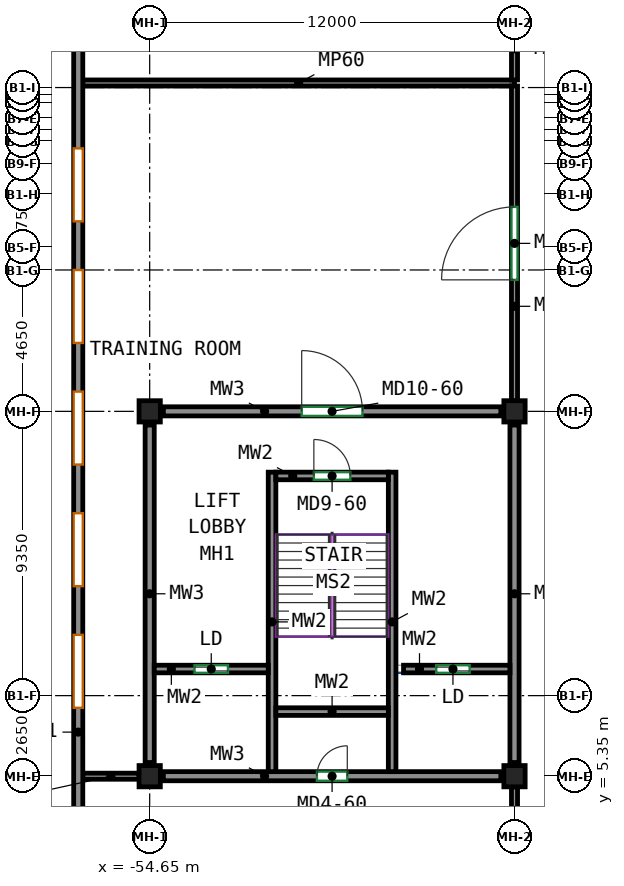
"""IFC4 building model, lengths in metres.
Left out: names, types, materials, properties, quantities, classifications, styles, units other than length and angle.
Written with IfcOpenShell. Run it as: python <this file> out.ifc"""

import sys

from ifc_helpers import new_model, si_unit, direction, frame, frame_2d, origin, origin_2d, place, context, subcontext, project, spatial, rectangle, extrude, source, transform, mapped, element, fill, save


model = new_model("IFC4")
c1 = context("Model", 3, precision=1e-05, world=origin(), true_north=direction((0.0, 1.0)))
c2 = subcontext(c1, "Body", "Model", "MODEL_VIEW")
j1 = project(units=[si_unit("LENGTHUNIT", "METRE"), si_unit("PLANEANGLEUNIT", "RADIAN")], contexts=[c1])
p1 = place(None, origin())
s1 = spatial("IfcSite", under=j1, at=p1, CompositionType="ELEMENT")
p2 = place(p1, origin())
s2 = spatial("IfcBuilding", under=s1, at=p2, CompositionType="ELEMENT")
p3 = place(p2, frame((0.0, 0.0, 18.0)))
s3 = spatial("IfcBuildingStorey", under=s2, at=p3, CompositionType="ELEMENT", Elevation=18.0)
m1 = source(origin(), c2, "Body", "SweptSolid", [
    extrude(rectangle(XDim=0.7, YDim=0.7, at=origin_2d()), origin(), (0.0, 0.0, 1.0), 4.1),
])
for number, where, z_axis, x_axis in (
    (1, (-54.65, 5.35, 0.0), (0.0, 0.0, 1.0), (1.0, 0.0, 0.0)),
    (2, (-54.65, 17.35, 0.0), (0.0, 0.0, 1.0), (1.0, 0.0, 0.0)),
    (3, (-42.65, 5.35, 0.0), (0.0, 0.0, 1.0), (1.0, 0.0, 0.0)),
    (4, (-42.65, 17.35, 0.0), (0.0, 0.0, 1.0), (1.0, 0.0, 0.0)),
):
    element("IfcColumn", number, at=place(p3, frame(where, z_axis=z_axis, x_axis=x_axis)), inside=s3, PredefinedType="COLUMN", context=c2, shape_type="MappedRepresentation", body=[
        mapped(m1, transform((0.0, 0.0, 0.0))),
    ])
m2 = source(origin(), c2, "Body", "SweptSolid", [
    extrude(rectangle(XDim=11.1, YDim=0.3, at=frame_2d((5.55, 0.0))), origin(), (0.0, 0.0, 1.0), 3.3),
])
p4 = place(p3, frame((-54.2, 5.35, 0.0), z_axis=(0.0, 0.0, 1.0), x_axis=(1.0, 0.0, 0.0)))
e5 = element("IfcWall", 5, at=p4, inside=s3, PredefinedType="SHEAR", context=c2, shape_type="MappedRepresentation", body=[
    mapped(m2, transform((0.0, 0.0, 0.0))),
])
p5 = place(p4, frame((5.05, 0.0, 0.0)))
e6 = element("IfcOpeningElement", 6, at=p5, cuts=e5, PredefinedType="OPENING", context=c2, shape_type="SweptSolid", body=[
    extrude(rectangle(XDim=1.0, YDim=2.1, at=frame_2d((0.5, 1.05))), frame((0.0, 0.16, 0.0), z_axis=(0.0, -1.0, 0.0), x_axis=(1.0, 0.0, 0.0)), (0.0, 0.0, 1.0), 0.32),
])
p6 = place(p3, frame((-54.2, 17.35, 0.0), z_axis=(0.0, 0.0, 1.0), x_axis=(1.0, 0.0, 0.0)))
e7 = element("IfcWall", 7, at=p6, inside=s3, PredefinedType="SHEAR", context=c2, shape_type="MappedRepresentation", body=[
    mapped(m2, transform((0.0, 0.0, 0.0))),
])
p7 = place(p6, frame((4.55, 0.0, 0.0)))
e8 = element("IfcOpeningElement", 8, at=p7, cuts=e7, PredefinedType="OPENING", context=c2, shape_type="SweptSolid", body=[
    extrude(rectangle(XDim=2.0, YDim=2.4, at=frame_2d((1.0, 1.2))), frame((0.0, 0.16, 0.0), z_axis=(0.0, -1.0, 0.0), x_axis=(1.0, 0.0, 0.0)), (0.0, 0.0, 1.0), 0.32),
])
for number, where, z_axis, x_axis in (
    (9, (-54.65, 5.8, 0.0), (0.0, 0.0, 1.0), (0.0, 1.0, 0.0)),
    (10, (-42.65, 5.8, 0.0), (0.0, 0.0, 1.0), (0.0, 1.0, 0.0)),
):
    element("IfcWall", number, at=place(p3, frame(where, z_axis=z_axis, x_axis=x_axis)), inside=s3, PredefinedType="SHEAR", context=c2, shape_type="MappedRepresentation", body=[
        mapped(m2, transform((0.0, 0.0, 0.0))),
    ])
m3 = source(origin(), c2, "Body", "SweptSolid", [
    extrude(rectangle(XDim=9.85, YDim=0.25, at=frame_2d((4.925, 0.0))), origin(), (0.0, 0.0, 1.0), 4.1),
])
for number, where, z_axis, x_axis in (
    (11, (-50.625, 5.5, 0.0), (0.0, 0.0, 1.0), (0.0, 1.0, 0.0)),
    (12, (-46.675, 5.5, 0.0), (0.0, 0.0, 1.0), (0.0, 1.0, 0.0)),
):
    element("IfcWall", number, at=place(p3, frame(where, z_axis=z_axis, x_axis=x_axis)), inside=s3, PredefinedType="SHEAR", context=c2, shape_type="MappedRepresentation", body=[
        mapped(m3, transform((0.0, 0.0, 0.0))),
    ])
m4 = source(origin(), c2, "Body", "SweptSolid", [
    extrude(rectangle(XDim=3.7, YDim=0.25, at=frame_2d((1.85, 0.0))), origin(), (0.0, 0.0, 1.0), 4.1),
])
p8 = place(p3, frame((-50.5, 7.475, 0.0), z_axis=(0.0, 0.0, 1.0), x_axis=(1.0, 0.0, 0.0)))
e13 = element("IfcWall", 13, at=p8, inside=s3, PredefinedType="SHEAR", context=c2, shape_type="MappedRepresentation", body=[
    mapped(m4, transform((0.0, 0.0, 0.0))),
])
p9 = place(p3, frame((-50.5, 15.225, 0.0), z_axis=(0.0, 0.0, 1.0), x_axis=(1.0, 0.0, 0.0)))
e14 = element("IfcWall", 14, at=p9, inside=s3, PredefinedType="SHEAR", context=c2, shape_type="MappedRepresentation", body=[
    mapped(m4, transform((0.0, 0.0, 0.0))),
])
p10 = place(p9, frame((1.25, 0.0, 0.0)))
e15 = element("IfcOpeningElement", 15, at=p10, cuts=e14, PredefinedType="OPENING", context=c2, shape_type="SweptSolid", body=[
    extrude(rectangle(XDim=1.2, YDim=2.1, at=frame_2d((0.6, 1.05))), frame((0.0, 0.135, 0.0), z_axis=(0.0, -1.0, 0.0), x_axis=(1.0, 0.0, 0.0)), (0.0, 0.0, 1.0), 0.27),
])
m5 = source(origin(), c2, "Body", "SweptSolid", [
    extrude(rectangle(XDim=3.75, YDim=0.25, at=frame_2d((1.875, 0.0))), origin(), (0.0, 0.0, 1.0), 4.1),
])
p11 = place(p3, frame((-54.5, 8.875, 0.0), z_axis=(0.0, 0.0, 1.0), x_axis=(1.0, 0.0, 0.0)))
e16 = element("IfcWall", 16, at=p11, inside=s3, PredefinedType="SHEAR", context=c2, shape_type="MappedRepresentation", body=[
    mapped(m5, transform((0.0, 0.0, 0.0))),
])
p12 = place(p11, frame((1.325, 0.0, 0.0)))
e17 = element("IfcOpeningElement", 17, at=p12, cuts=e16, PredefinedType="OPENING", context=c2, shape_type="SweptSolid", body=[
    extrude(rectangle(XDim=1.1, YDim=2.1, at=frame_2d((0.55, 1.05))), frame((0.0, 0.135, 0.0), z_axis=(0.0, -1.0, 0.0), x_axis=(1.0, 0.0, 0.0)), (0.0, 0.0, 1.0), 0.27),
])
m6 = source(origin(), c2, "Body", "SweptSolid", [
    extrude(rectangle(XDim=3.5, YDim=0.25, at=frame_2d((1.75, 0.0))), origin(), (0.0, 0.0, 1.0), 4.1),
])
p13 = place(p3, frame((-46.3, 8.875, 0.0), z_axis=(0.0, 0.0, 1.0), x_axis=(1.0, 0.0, 0.0)))
e18 = element("IfcWall", 18, at=p13, inside=s3, PredefinedType="SHEAR", context=c2, shape_type="MappedRepresentation", body=[
    mapped(m6, transform((0.0, 0.0, 0.0))),
])
p14 = place(p13, frame((1.075, 0.0, 0.0)))
e19 = element("IfcOpeningElement", 19, at=p14, cuts=e18, PredefinedType="OPENING", context=c2, shape_type="SweptSolid", body=[
    extrude(rectangle(XDim=1.1, YDim=2.1, at=frame_2d((0.55, 1.05))), frame((0.0, 0.135, 0.0), z_axis=(0.0, -1.0, 0.0), x_axis=(1.0, 0.0, 0.0)), (0.0, 0.0, 1.0), 0.27),
])
m7 = source(origin(), c2, "Body", "SweptSolid", [
    extrude(rectangle(XDim=100.7, YDim=0.3, at=frame_2d((50.35, 0.0))), origin(), (0.0, 0.0, 1.0), 4.1),
])
p15 = place(p3, frame((-57.0, -43.55, 0.0), z_axis=(0.0, 0.0, 1.0), x_axis=(0.0, 1.0, 0.0)))
e20 = element("IfcWall", 20, at=p15, inside=s3, PredefinedType="SOLIDWALL", context=c2, shape_type="MappedRepresentation", body=[
    mapped(m7, transform((0.0, 0.0, 0.0))),
])
p16 = place(p15, frame((3.15, 0.0, 0.9)))
e21 = element("IfcOpeningElement", 21, at=p16, cuts=e20, PredefinedType="OPENING", context=c2, shape_type="SweptSolid", body=[
    extrude(rectangle(XDim=2.4, YDim=1.8, at=frame_2d((1.2, 0.9))), frame((0.0, 0.16, 0.0), z_axis=(0.0, -1.0, 0.0), x_axis=(1.0, 0.0, 0.0)), (0.0, 0.0, 1.0), 0.32),
])
p17 = place(p15, frame((7.15, 0.0, 0.9)))
e22 = element("IfcOpeningElement", 22, at=p17, cuts=e20, PredefinedType="OPENING", context=c2, shape_type="SweptSolid", body=[
    extrude(rectangle(XDim=2.4, YDim=1.8, at=frame_2d((1.2, 0.9))), frame((0.0, 0.16, 0.0), z_axis=(0.0, -1.0, 0.0), x_axis=(1.0, 0.0, 0.0)), (0.0, 0.0, 1.0), 0.32),
])
p18 = place(p15, frame((11.15, 0.0, 0.9)))
e23 = element("IfcOpeningElement", 23, at=p18, cuts=e20, PredefinedType="OPENING", context=c2, shape_type="SweptSolid", body=[
    extrude(rectangle(XDim=2.4, YDim=1.8, at=frame_2d((1.2, 0.9))), frame((0.0, 0.16, 0.0), z_axis=(0.0, -1.0, 0.0), x_axis=(1.0, 0.0, 0.0)), (0.0, 0.0, 1.0), 0.32),
])
p19 = place(p15, frame((19.15, 0.0, 0.9)))
e24 = element("IfcOpeningElement", 24, at=p19, cuts=e20, PredefinedType="OPENING", context=c2, shape_type="SweptSolid", body=[
    extrude(rectangle(XDim=2.4, YDim=1.8, at=frame_2d((1.2, 0.9))), frame((0.0, 0.16, 0.0), z_axis=(0.0, -1.0, 0.0), x_axis=(1.0, 0.0, 0.0)), (0.0, 0.0, 1.0), 0.32),
])
p20 = place(p15, frame((23.15, 0.0, 0.9)))
e25 = element("IfcOpeningElement", 25, at=p20, cuts=e20, PredefinedType="OPENING", context=c2, shape_type="SweptSolid", body=[
    extrude(rectangle(XDim=2.4, YDim=1.8, at=frame_2d((1.2, 0.9))), frame((0.0, 0.16, 0.0), z_axis=(0.0, -1.0, 0.0), x_axis=(1.0, 0.0, 0.0)), (0.0, 0.0, 1.0), 0.32),
])
p21 = place(p15, frame((27.15, 0.0, 0.9)))
e26 = element("IfcOpeningElement", 26, at=p21, cuts=e20, PredefinedType="OPENING", context=c2, shape_type="SweptSolid", body=[
    extrude(rectangle(XDim=2.4, YDim=1.8, at=frame_2d((1.2, 0.9))), frame((0.0, 0.16, 0.0), z_axis=(0.0, -1.0, 0.0), x_axis=(1.0, 0.0, 0.0)), (0.0, 0.0, 1.0), 0.32),
])
p22 = place(p15, frame((31.15, 0.0, 0.9)))
e27 = element("IfcOpeningElement", 27, at=p22, cuts=e20, PredefinedType="OPENING", context=c2, shape_type="SweptSolid", body=[
    extrude(rectangle(XDim=2.4, YDim=1.8, at=frame_2d((1.2, 0.9))), frame((0.0, 0.16, 0.0), z_axis=(0.0, -1.0, 0.0), x_axis=(1.0, 0.0, 0.0)), (0.0, 0.0, 1.0), 0.32),
])
p23 = place(p15, frame((39.15, 0.0, 0.9)))
e28 = element("IfcOpeningElement", 28, at=p23, cuts=e20, PredefinedType="OPENING", context=c2, shape_type="SweptSolid", body=[
    extrude(rectangle(XDim=2.4, YDim=1.8, at=frame_2d((1.2, 0.9))), frame((0.0, 0.16, 0.0), z_axis=(0.0, -1.0, 0.0), x_axis=(1.0, 0.0, 0.0)), (0.0, 0.0, 1.0), 0.32),
])
p24 = place(p15, frame((43.15, 0.0, 0.9)))
e29 = element("IfcOpeningElement", 29, at=p24, cuts=e20, PredefinedType="OPENING", context=c2, shape_type="SweptSolid", body=[
    extrude(rectangle(XDim=2.4, YDim=1.8, at=frame_2d((1.2, 0.9))), frame((0.0, 0.16, 0.0), z_axis=(0.0, -1.0, 0.0), x_axis=(1.0, 0.0, 0.0)), (0.0, 0.0, 1.0), 0.32),
])
p25 = place(p15, frame((51.15, 0.0, 0.9)))
e30 = element("IfcOpeningElement", 30, at=p25, cuts=e20, PredefinedType="OPENING", context=c2, shape_type="SweptSolid", body=[
    extrude(rectangle(XDim=2.4, YDim=1.8, at=frame_2d((1.2, 0.9))), frame((0.0, 0.16, 0.0), z_axis=(0.0, -1.0, 0.0), x_axis=(1.0, 0.0, 0.0)), (0.0, 0.0, 1.0), 0.32),
])
p26 = place(p15, frame((55.15, 0.0, 0.9)))
e31 = element("IfcOpeningElement", 31, at=p26, cuts=e20, PredefinedType="OPENING", context=c2, shape_type="SweptSolid", body=[
    extrude(rectangle(XDim=2.4, YDim=1.8, at=frame_2d((1.2, 0.9))), frame((0.0, 0.16, 0.0), z_axis=(0.0, -1.0, 0.0), x_axis=(1.0, 0.0, 0.0)), (0.0, 0.0, 1.0), 0.32),
])
p27 = place(p15, frame((59.15, 0.0, 0.9)))
e32 = element("IfcOpeningElement", 32, at=p27, cuts=e20, PredefinedType="OPENING", context=c2, shape_type="SweptSolid", body=[
    extrude(rectangle(XDim=2.4, YDim=1.8, at=frame_2d((1.2, 0.9))), frame((0.0, 0.16, 0.0), z_axis=(0.0, -1.0, 0.0), x_axis=(1.0, 0.0, 0.0)), (0.0, 0.0, 1.0), 0.32),
])
p28 = place(p15, frame((63.15, 0.0, 0.9)))
e33 = element("IfcOpeningElement", 33, at=p28, cuts=e20, PredefinedType="OPENING", context=c2, shape_type="SweptSolid", body=[
    extrude(rectangle(XDim=2.4, YDim=1.8, at=frame_2d((1.2, 0.9))), frame((0.0, 0.16, 0.0), z_axis=(0.0, -1.0, 0.0), x_axis=(1.0, 0.0, 0.0)), (0.0, 0.0, 1.0), 0.32),
])
p29 = place(p15, frame((67.15, 0.0, 0.9)))
e34 = element("IfcOpeningElement", 34, at=p29, cuts=e20, PredefinedType="OPENING", context=c2, shape_type="SweptSolid", body=[
    extrude(rectangle(XDim=2.4, YDim=1.8, at=frame_2d((1.2, 0.9))), frame((0.0, 0.16, 0.0), z_axis=(0.0, -1.0, 0.0), x_axis=(1.0, 0.0, 0.0)), (0.0, 0.0, 1.0), 0.32),
])
p30 = place(p15, frame((75.15, 0.0, 0.9)))
e35 = element("IfcOpeningElement", 35, at=p30, cuts=e20, PredefinedType="OPENING", context=c2, shape_type="SweptSolid", body=[
    extrude(rectangle(XDim=2.4, YDim=1.8, at=frame_2d((1.2, 0.9))), frame((0.0, 0.16, 0.0), z_axis=(0.0, -1.0, 0.0), x_axis=(1.0, 0.0, 0.0)), (0.0, 0.0, 1.0), 0.32),
])
p31 = place(p15, frame((79.15, 0.0, 0.9)))
e36 = element("IfcOpeningElement", 36, at=p31, cuts=e20, PredefinedType="OPENING", context=c2, shape_type="SweptSolid", body=[
    extrude(rectangle(XDim=2.4, YDim=1.8, at=frame_2d((1.2, 0.9))), frame((0.0, 0.16, 0.0), z_axis=(0.0, -1.0, 0.0), x_axis=(1.0, 0.0, 0.0)), (0.0, 0.0, 1.0), 0.32),
])
p32 = place(p15, frame((83.15, 0.0, 0.9)))
e37 = element("IfcOpeningElement", 37, at=p32, cuts=e20, PredefinedType="OPENING", context=c2, shape_type="SweptSolid", body=[
    extrude(rectangle(XDim=2.4, YDim=1.8, at=frame_2d((1.2, 0.9))), frame((0.0, 0.16, 0.0), z_axis=(0.0, -1.0, 0.0), x_axis=(1.0, 0.0, 0.0)), (0.0, 0.0, 1.0), 0.32),
])
p33 = place(p15, frame((87.15, 0.0, 0.9)))
e38 = element("IfcOpeningElement", 38, at=p33, cuts=e20, PredefinedType="OPENING", context=c2, shape_type="SweptSolid", body=[
    extrude(rectangle(XDim=2.4, YDim=1.8, at=frame_2d((1.2, 0.9))), frame((0.0, 0.16, 0.0), z_axis=(0.0, -1.0, 0.0), x_axis=(1.0, 0.0, 0.0)), (0.0, 0.0, 1.0), 0.32),
])
p34 = place(p15, frame((91.15, 0.0, 0.9)))
e39 = element("IfcOpeningElement", 39, at=p34, cuts=e20, PredefinedType="OPENING", context=c2, shape_type="SweptSolid", body=[
    extrude(rectangle(XDim=2.4, YDim=1.8, at=frame_2d((1.2, 0.9))), frame((0.0, 0.16, 0.0), z_axis=(0.0, -1.0, 0.0), x_axis=(1.0, 0.0, 0.0)), (0.0, 0.0, 1.0), 0.32),
])
p35 = place(p15, frame((95.15, 0.0, 0.9)))
e40 = element("IfcOpeningElement", 40, at=p35, cuts=e20, PredefinedType="OPENING", context=c2, shape_type="SweptSolid", body=[
    extrude(rectangle(XDim=2.4, YDim=1.8, at=frame_2d((1.2, 0.9))), frame((0.0, 0.16, 0.0), z_axis=(0.0, -1.0, 0.0), x_axis=(1.0, 0.0, 0.0)), (0.0, 0.0, 1.0), 0.32),
])
m8 = source(origin(), c2, "Body", "SweptSolid", [
    extrude(rectangle(XDim=1.85, YDim=0.2, at=frame_2d((0.925, 0.0))), origin(), (0.0, 0.0, 1.0), 4.1),
])
p36 = place(p3, frame((-56.85, 5.35, 0.0), z_axis=(0.0, 0.0, 1.0), x_axis=(1.0, 0.0, 0.0)))
e41 = element("IfcWall", 41, at=p36, inside=s3, PredefinedType="PARTITIONING", context=c2, shape_type="MappedRepresentation", body=[
    mapped(m8, transform((0.0, 0.0, 0.0))),
])
m9 = source(origin(), c2, "Body", "SweptSolid", [
    extrude(rectangle(XDim=14.2, YDim=0.2, at=frame_2d((7.1, 0.0))), origin(), (0.0, 0.0, 1.0), 3.3),
])
p37 = place(p3, frame((-56.85, 28.15, 0.0), z_axis=(0.0, 0.0, 1.0), x_axis=(1.0, 0.0, 0.0)))
e42 = element("IfcWall", 42, at=p37, inside=s3, PredefinedType="PARTITIONING", context=c2, shape_type="MappedRepresentation", body=[
    mapped(m9, transform((0.0, 0.0, 0.0))),
])
m10 = source(origin(), c2, "Body", "SweptSolid", [
    extrude(rectangle(XDim=11.3, YDim=0.2, at=frame_2d((5.65, 0.0))), origin(), (0.0, 0.0, 1.0), 3.3),
])
p38 = place(p3, frame((-42.65, -6.3, 0.0), z_axis=(0.0, 0.0, 1.0), x_axis=(0.0, 1.0, 0.0)))
e43 = element("IfcWall", 43, at=p38, inside=s3, PredefinedType="PARTITIONING", context=c2, shape_type="MappedRepresentation", body=[
    mapped(m10, transform((0.0, 0.0, 0.0))),
])
p39 = place(p38, frame((5.15, 0.0, 0.0)))
e44 = element("IfcOpeningElement", 44, at=p39, cuts=e43, PredefinedType="OPENING", context=c2, shape_type="SweptSolid", body=[
    extrude(rectangle(XDim=1.0, YDim=2.1, at=frame_2d((0.5, 1.05))), frame((0.0, 0.11, 0.0), z_axis=(0.0, -1.0, 0.0), x_axis=(1.0, 0.0, 0.0)), (0.0, 0.0, 1.0), 0.22),
])
m11 = source(origin(), c2, "Body", "SweptSolid", [
    extrude(rectangle(XDim=10.35, YDim=0.2, at=frame_2d((5.175, 0.0))), origin(), (0.0, 0.0, 1.0), 3.3),
])
p40 = place(p3, frame((-42.65, 17.7, 0.0), z_axis=(0.0, 0.0, 1.0), x_axis=(0.0, 1.0, 0.0)))
e45 = element("IfcWall", 45, at=p40, inside=s3, PredefinedType="PARTITIONING", context=c2, shape_type="MappedRepresentation", body=[
    mapped(m11, transform((0.0, 0.0, 0.0))),
])
p41 = place(p40, frame((3.975, 0.0, 0.0)))
e46 = element("IfcOpeningElement", 46, at=p41, cuts=e45, PredefinedType="OPENING", context=c2, shape_type="SweptSolid", body=[
    extrude(rectangle(XDim=2.4, YDim=2.4, at=frame_2d((1.2, 1.2))), frame((0.0, 0.11, 0.0), z_axis=(0.0, -1.0, 0.0), x_axis=(1.0, 0.0, 0.0)), (0.0, 0.0, 1.0), 0.22),
])
m12 = source(origin(), c2, "Body", "SweptSolid", [
    extrude(rectangle(XDim=2.05, YDim=0.2, at=frame_2d((1.025, 0.0))), origin(), (0.0, 0.0, 1.0), 3.3),
])
p42 = place(p3, frame((-42.65, 28.25, 0.0), z_axis=(0.0, 0.0, 1.0), x_axis=(0.0, 1.0, 0.0)))
e47 = element("IfcWall", 47, at=p42, inside=s3, PredefinedType="PARTITIONING", context=c2, shape_type="MappedRepresentation", body=[
    mapped(m12, transform((0.0, 0.0, 0.0))),
])
p43 = place(p25, origin())
e48 = element("IfcWindow", 48, at=p43, inside=s3, PartitioningType="SINGLE_PANEL", PredefinedType="WINDOW", context=c2, shape_type="SweptSolid", body=[
    extrude(rectangle(XDim=2.4, YDim=1.8, at=frame_2d((1.2, 0.9))), frame((0.0, 0.03, 0.0), z_axis=(0.0, -1.0, 0.0), x_axis=(1.0, 0.0, 0.0)), (0.0, 0.0, 1.0), 0.06),
])
fill(e30, e48)
p44 = place(p26, origin())
e49 = element("IfcWindow", 49, at=p44, inside=s3, PartitioningType="SINGLE_PANEL", PredefinedType="WINDOW", context=c2, shape_type="SweptSolid", body=[
    extrude(rectangle(XDim=2.4, YDim=1.8, at=frame_2d((1.2, 0.9))), frame((0.0, 0.03, 0.0), z_axis=(0.0, -1.0, 0.0), x_axis=(1.0, 0.0, 0.0)), (0.0, 0.0, 1.0), 0.06),
])
fill(e31, e49)
p45 = place(p27, origin())
e50 = element("IfcWindow", 50, at=p45, inside=s3, PartitioningType="SINGLE_PANEL", PredefinedType="WINDOW", context=c2, shape_type="SweptSolid", body=[
    extrude(rectangle(XDim=2.4, YDim=1.8, at=frame_2d((1.2, 0.9))), frame((0.0, 0.03, 0.0), z_axis=(0.0, -1.0, 0.0), x_axis=(1.0, 0.0, 0.0)), (0.0, 0.0, 1.0), 0.06),
])
fill(e32, e50)
p46 = place(p28, origin())
e51 = element("IfcWindow", 51, at=p46, inside=s3, PartitioningType="SINGLE_PANEL", PredefinedType="WINDOW", context=c2, shape_type="SweptSolid", body=[
    extrude(rectangle(XDim=2.4, YDim=1.8, at=frame_2d((1.2, 0.9))), frame((0.0, 0.03, 0.0), z_axis=(0.0, -1.0, 0.0), x_axis=(1.0, 0.0, 0.0)), (0.0, 0.0, 1.0), 0.06),
])
fill(e33, e51)
p47 = place(p29, origin())
e52 = element("IfcWindow", 52, at=p47, inside=s3, PartitioningType="SINGLE_PANEL", PredefinedType="WINDOW", context=c2, shape_type="SweptSolid", body=[
    extrude(rectangle(XDim=2.4, YDim=1.8, at=frame_2d((1.2, 0.9))), frame((0.0, 0.03, 0.0), z_axis=(0.0, -1.0, 0.0), x_axis=(1.0, 0.0, 0.0)), (0.0, 0.0, 1.0), 0.06),
])
fill(e34, e52)
p48 = place(p10, origin())
e53 = element("IfcDoor", 53, at=p48, inside=s3, OperationType="DOUBLE_DOOR_SINGLE_SWING", PredefinedType="DOOR", context=c2, shape_type="SweptSolid", body=[
    extrude(rectangle(XDim=1.2, YDim=2.1, at=frame_2d((0.6, 1.05))), frame((0.0, 0.025, 0.0), z_axis=(0.0, -1.0, 0.0), x_axis=(1.0, 0.0, 0.0)), (0.0, 0.0, 1.0), 0.05),
])
fill(e15, e53)
p49 = place(p7, origin())
e54 = element("IfcDoor", 54, at=p49, inside=s3, OperationType="DOUBLE_DOOR_SINGLE_SWING", PredefinedType="DOOR", context=c2, shape_type="SweptSolid", body=[
    extrude(rectangle(XDim=2.0, YDim=2.4, at=frame_2d((1.0, 1.2))), frame((0.0, 0.025, 0.0), z_axis=(0.0, -1.0, 0.0), x_axis=(1.0, 0.0, 0.0)), (0.0, 0.0, 1.0), 0.05),
])
fill(e8, e54)
p50 = place(p12, origin())
e55 = element("IfcDoor", 55, at=p50, inside=s3, OperationType="SLIDING_TO_LEFT", PredefinedType="DOOR", context=c2, shape_type="SweptSolid", body=[
    extrude(rectangle(XDim=1.1, YDim=2.1, at=frame_2d((0.55, 1.05))), frame((0.0, 0.025, 0.0), z_axis=(0.0, -1.0, 0.0), x_axis=(1.0, 0.0, 0.0)), (0.0, 0.0, 1.0), 0.05),
])
fill(e17, e55)
p51 = place(p14, origin())
e56 = element("IfcDoor", 56, at=p51, inside=s3, OperationType="SLIDING_TO_LEFT", PredefinedType="DOOR", context=c2, shape_type="SweptSolid", body=[
    extrude(rectangle(XDim=1.1, YDim=2.1, at=frame_2d((0.55, 1.05))), frame((0.0, 0.025, 0.0), z_axis=(0.0, -1.0, 0.0), x_axis=(1.0, 0.0, 0.0)), (0.0, 0.0, 1.0), 0.05),
])
fill(e19, e56)
p52 = place(p5, origin())
e57 = element("IfcDoor", 57, at=p52, inside=s3, OperationType="SINGLE_SWING_RIGHT", PredefinedType="DOOR", context=c2, shape_type="SweptSolid", body=[
    extrude(rectangle(XDim=1.0, YDim=2.1, at=frame_2d((0.5, 1.05))), frame((0.0, 0.025, 0.0), z_axis=(0.0, -1.0, 0.0), x_axis=(1.0, 0.0, 0.0)), (0.0, 0.0, 1.0), 0.05),
])
fill(e6, e57)
p53 = place(p41, origin())
e58 = element("IfcDoor", 58, at=p53, inside=s3, OperationType="DOUBLE_DOOR_SINGLE_SWING", PredefinedType="DOOR", context=c2, shape_type="SweptSolid", body=[
    extrude(rectangle(XDim=2.4, YDim=2.4, at=frame_2d((1.2, 1.2))), frame((0.0, 0.025, 0.0), z_axis=(0.0, -1.0, 0.0), x_axis=(1.0, 0.0, 0.0)), (0.0, 0.0, 1.0), 0.05),
])
fill(e46, e58)
save(model, sys.argv[1])
